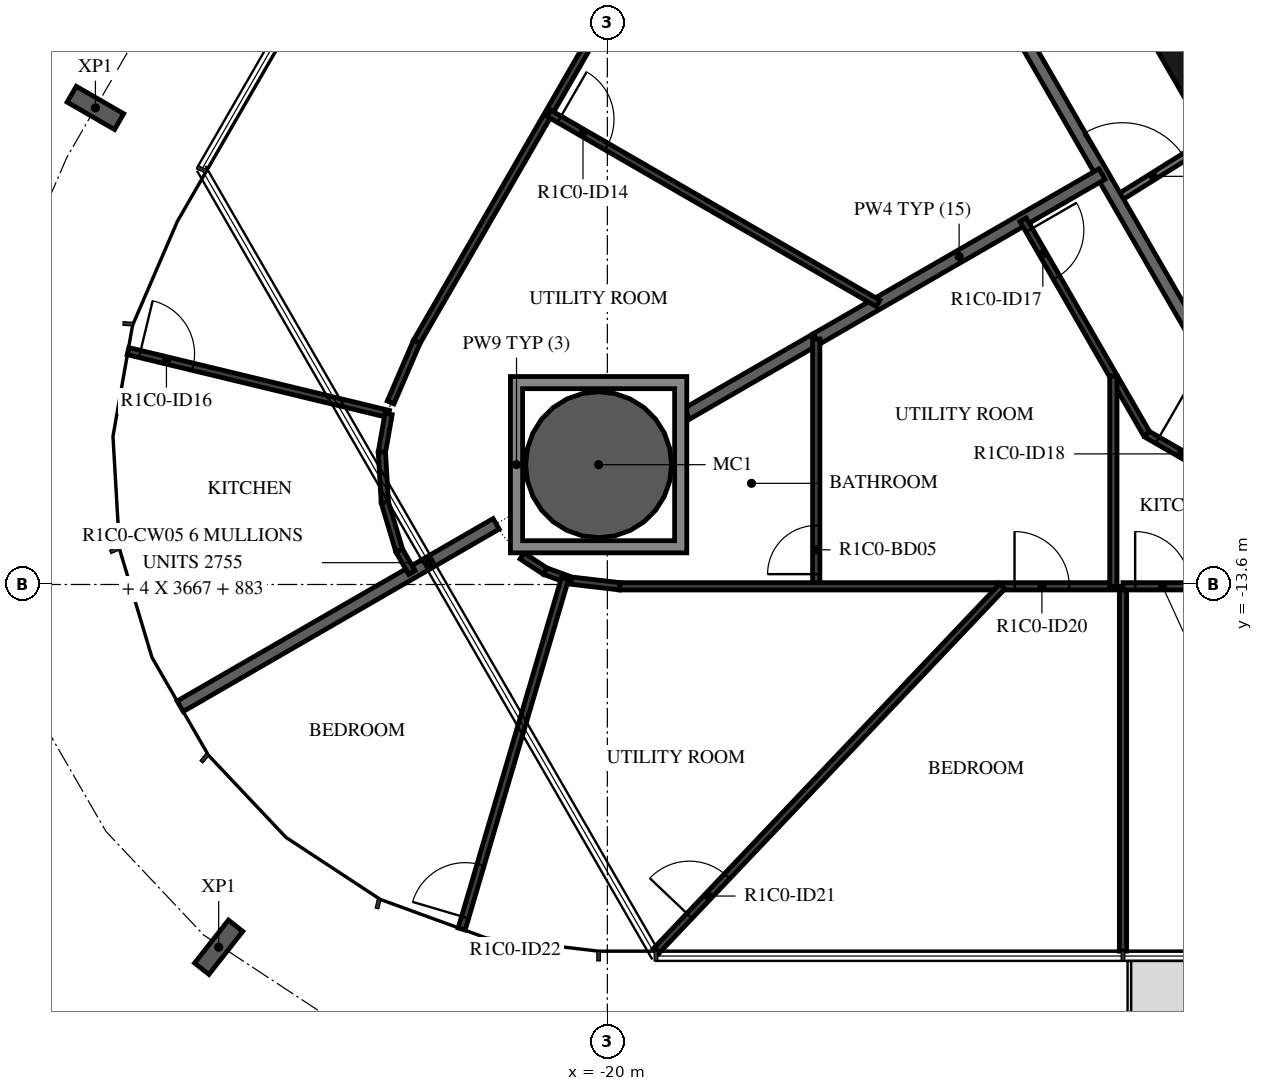
"""IFC4 building model, lengths in metres.
Left out: names, types, materials, properties, quantities, classifications, styles, units other than length and angle.
Written with IfcOpenShell. Run it as: python <this file> out.ifc"""

import sys

from ifc_helpers import new_model, si_unit, direction, frame, frame_2d, origin, origin_2d, place, context, subcontext, project, spatial, polyline, rectangle, hollow_circle, i_section, outline, extrude, element, fill, save


model = new_model("IFC4")
c1 = context("Model", 3, precision=1e-05, world=origin(), true_north=direction((0.0, 1.0)))
c2 = subcontext(c1, "Body", "Model", "MODEL_VIEW")
j1 = project(units=[si_unit("LENGTHUNIT", "METRE"), si_unit("PLANEANGLEUNIT", "RADIAN")], contexts=[c1])
p1 = place(None, origin())
s1 = spatial("IfcSite", under=j1, at=p1, CompositionType="ELEMENT")
p2 = place(p1, origin())
s2 = spatial("IfcBuilding", under=s1, at=p2, CompositionType="ELEMENT")
p3 = place(p2, frame((0.0, 0.0, 66.4)))
s3 = spatial("IfcBuildingStorey", under=s2, at=p3, CompositionType="ELEMENT", Elevation=66.4)
p4 = place(p3, frame((-20.144, -11.63, -0.38), z_axis=(0.0, 0.0, 1.0), x_axis=(1.0, 0.0, 0.0)))
e1 = element("IfcColumn", 1, at=p4, inside=s3, PredefinedType="COLUMN", context=c2, shape_type="SweptSolid", body=[
    extrude(hollow_circle(Radius=1.2, WallThickness=0.06, at=origin_2d()), origin(), (0.0, 0.0, 1.0), 2.616),
])
for number, where, z_axis, x_axis in (
    (2, (-28.419, -5.763, -0.38), (0.0, 0.0, 1.0), (0.5, 0.866, 0.0)),
    (3, (-26.392, -19.565, -0.38), (0.0, 0.0, 1.0), (-0.786, 0.619, 0.0)),
):
    element("IfcColumn", number, at=place(p3, frame(where, z_axis=z_axis, x_axis=x_axis)), inside=s3, PredefinedType="COLUMN", context=c2, shape_type="SweptSolid", body=[
        extrude(i_section(OverallWidth=0.3, OverallDepth=0.9, WebThickness=0.019, FlangeThickness=0.035, FilletRadius=0.03, at=origin_2d()), origin(), (0.0, 0.0, 1.0), 2.616),
    ])
p5 = place(p3, frame((-10.845, -4.51, 0.0), z_axis=(0.0, 0.0, 1.0), x_axis=(0.500087131594, -0.865975092491, 0.0)))
e4 = element("IfcWall", 4, at=p5, inside=s3, PredefinedType="SHEAR", context=c2, shape_type="SweptSolid", body=[
    extrude(rectangle(XDim=3.033, YDim=0.5, at=frame_2d((1.516, 0.0))), origin(), (0.0, 0.0, 1.0), 3.05),
])
p6 = place(p3, frame((-11.625, -7.264, 0.0), z_axis=(0.0, 0.0, 1.0), x_axis=(0.84803632456, 0.529938102259, 0.0)))
e5 = element("IfcWall", 5, at=p6, inside=s3, PredefinedType="PARTITIONING", context=c2, shape_type="SweptSolid", body=[
    extrude(rectangle(XDim=1.804, YDim=0.12, at=frame_2d((0.902, 0.0))), origin(), (0.0, 0.0, 1.0), 3.05),
])
p7 = place(p6, frame((0.11, 0.0, 0.0)))
e6 = element("IfcOpeningElement", 6, at=p7, cuts=e5, PredefinedType="OPENING", context=c2, shape_type="SweptSolid", body=[
    extrude(rectangle(XDim=1.2, YDim=2.1, at=frame_2d((0.6, 1.05))), frame((0.0, 0.07, 0.0), z_axis=(0.0, -1.0, 0.0), x_axis=(1.0, 0.0, 0.0)), (0.0, 0.0, 1.0), 0.14),
])
p8 = place(p3, frame((-13.7, -3.671, 0.0), z_axis=(0.0, 0.0, 1.0), x_axis=(0.500001669485, -0.866024439905, 0.0)))
e7 = element("IfcWall", 7, at=p8, inside=s3, PredefinedType="STANDARD", context=c2, shape_type="SweptSolid", body=[
    extrude(rectangle(XDim=7.342, YDim=0.2, at=frame_2d((3.671, 0.0))), origin(), (0.0, 0.0, 1.0), 3.05),
])
p9 = place(p3, frame((-16.565, -9.564, 0.0), z_axis=(0.0, 0.0, 1.0), x_axis=(0.866028274568, 0.499995027624, 0.0)))
e8 = element("IfcWall", 8, at=p9, inside=s3, PredefinedType="STANDARD", context=c2, shape_type="SweptSolid", body=[
    extrude(rectangle(XDim=5.427, YDim=0.2, at=frame_2d((2.714, 0.0))), origin(), (0.0, 0.0, 1.0), 3.05),
])
p10 = place(p3, frame((-27.025, -15.603, 0.0), z_axis=(0.0, 0.0, 1.0), x_axis=(0.866020924479, 0.500007758305, 0.0)))
e9 = element("IfcWall", 9, at=p10, inside=s3, PredefinedType="STANDARD", context=c2, shape_type="SweptSolid", body=[
    extrude(rectangle(XDim=6.0, YDim=0.2, at=frame_2d((3.0, 0.0))), origin(), (0.0, 0.0, 1.0), 3.05),
])
p11 = place(p3, frame((-18.694, -10.793, 0.0), z_axis=(0.0, 0.0, 1.0), x_axis=(0.866046662726, 0.499963176624, 0.0)))
e10 = element("IfcWall", 10, at=p11, inside=s3, PredefinedType="STANDARD", context=c2, shape_type="SweptSolid", body=[
    extrude(rectangle(XDim=2.458, YDim=0.2, at=frame_2d((1.229, 0.0))), origin(), (0.0, 0.0, 1.0), 3.05),
])
p12 = place(p3, frame((-17.13, 0.79, 0.0), z_axis=(0.0, 0.0, 1.0), x_axis=(-0.499997052475, -0.866027105532, 0.0)))
e11 = element("IfcWall", 11, at=p12, inside=s3, PredefinedType="PARTITIONING", context=c2, shape_type="SweptSolid", body=[
    extrude(rectangle(XDim=12.006, YDim=0.12, at=frame_2d((6.003, 0.0))), origin(), (0.0, 0.0, 1.0), 3.05),
])
p13 = place(p12, frame((1.498, 0.0, 0.0)))
e12 = element("IfcOpeningElement", 12, at=p13, cuts=e11, PredefinedType="OPENING", context=c2, shape_type="SweptSolid", body=[
    extrude(rectangle(XDim=0.9, YDim=2.1, at=frame_2d((0.45, 1.05))), frame((0.0, 0.07, 0.0), z_axis=(0.0, -1.0, 0.0), x_axis=(1.0, 0.0, 0.0)), (0.0, 0.0, 1.0), 0.14),
])
p14 = place(p3, frame((-20.963, -5.85, 0.0), z_axis=(0.0, 0.0, 1.0), x_axis=(0.866021746608, -0.500006334362, 0.0)))
e13 = element("IfcWall", 13, at=p14, inside=s3, PredefinedType="PARTITIONING", context=c2, shape_type="SweptSolid", body=[
    extrude(rectangle(XDim=6.253, YDim=0.12, at=frame_2d((3.127, 0.0))), origin(), (0.0, 0.0, 1.0), 3.05),
])
p15 = place(p14, frame((0.2, 0.0, 0.0)))
e14 = element("IfcOpeningElement", 14, at=p15, cuts=e13, PredefinedType="OPENING", context=c2, shape_type="SweptSolid", body=[
    extrude(rectangle(XDim=0.9, YDim=2.1, at=frame_2d((0.45, 1.05))), frame((0.0, 0.07, 0.0), z_axis=(0.0, -1.0, 0.0), x_axis=(1.0, 0.0, 0.0)), (0.0, 0.0, 1.0), 0.14),
])
p16 = place(p3, frame((-23.564, -10.606, 0.0), z_axis=(0.0, 0.0, 1.0), x_axis=(0.396195073027, 0.918166359713, 0.0)))
e15 = element("IfcWall", 15, at=p16, inside=s3, PredefinedType="PARTITIONING", context=c2, shape_type="SweptSolid", body=[
    extrude(rectangle(XDim=1.087, YDim=0.12, at=frame_2d((0.543, 0.0))), origin(), (0.0, 0.0, 1.0), 3.05),
])
p17 = place(p3, frame((-27.883, -9.762, 0.0), z_axis=(0.0, 0.0, 1.0), x_axis=(0.972097015458, -0.234579181809, 0.0)))
e16 = element("IfcWall", 16, at=p17, inside=s3, PredefinedType="PARTITIONING", context=c2, shape_type="SweptSolid", body=[
    extrude(rectangle(XDim=4.409, YDim=0.12, at=frame_2d((2.204, 0.0))), origin(), (0.0, 0.0, 1.0), 3.05),
])
p18 = place(p17, frame((0.2, 0.0, 0.0)))
e17 = element("IfcOpeningElement", 17, at=p18, cuts=e16, PredefinedType="OPENING", context=c2, shape_type="SweptSolid", body=[
    extrude(rectangle(XDim=0.9, YDim=2.1, at=frame_2d((0.45, 1.05))), frame((0.0, 0.07, 0.0), z_axis=(0.0, -1.0, 0.0), x_axis=(1.0, 0.0, 0.0)), (0.0, 0.0, 1.0), 0.14),
])
p19 = place(p3, frame((-23.597, -10.796, 0.0), z_axis=(0.0, 0.0, 1.0), x_axis=(-0.173610040386, -0.984814476882, 0.0)))
e18 = element("IfcWall", 18, at=p19, inside=s3, PredefinedType="PARTITIONING", context=c2, shape_type="SweptSolid", body=[
    extrude(rectangle(XDim=0.636, YDim=0.12, at=frame_2d((0.318, 0.0))), origin(), (0.0, 0.0, 1.0), 3.05),
])
p20 = place(p3, frame((-23.708, -11.422, 0.0), z_axis=(0.0, 0.0, 1.0), x_axis=(0.058031280246, -0.998314765248, 0.0)))
e19 = element("IfcWall", 19, at=p20, inside=s3, PredefinedType="PARTITIONING", context=c2, shape_type="SweptSolid", body=[
    extrude(rectangle(XDim=0.829, YDim=0.12, at=frame_2d((0.415, 0.0))), origin(), (0.0, 0.0, 1.0), 3.05),
])
p21 = place(p3, frame((-23.659, -12.25, 0.0), z_axis=(0.0, 0.0, 1.0), x_axis=(0.286834510868, -0.957980147694, 0.0)))
e20 = element("IfcWall", 20, at=p21, inside=s3, PredefinedType="PARTITIONING", context=c2, shape_type="SweptSolid", body=[
    extrude(rectangle(XDim=0.829, YDim=0.12, at=frame_2d((0.415, 0.0))), origin(), (0.0, 0.0, 1.0), 3.05),
])
p22 = place(p3, frame((-23.422, -13.044, 0.0), z_axis=(0.0, 0.0, 1.0), x_axis=(0.50013037474, -0.865950118807, 0.0)))
e21 = element("IfcWall", 21, at=p22, inside=s3, PredefinedType="PARTITIONING", context=c2, shape_type="SweptSolid", body=[
    extrude(rectangle(XDim=0.415, YDim=0.12, at=frame_2d((0.207, 0.0))), origin(), (0.0, 0.0, 1.0), 3.05),
])
p23 = place(p3, frame((-13.164, -7.6, 0.0), z_axis=(0.0, 0.0, 1.0), x_axis=(0.500000928893, -0.866024867487, 0.0)))
e22 = element("IfcWall", 22, at=p23, inside=s3, PredefinedType="PARTITIONING", context=c2, shape_type="SweptSolid", body=[
    extrude(rectangle(XDim=4.073, YDim=0.12, at=frame_2d((2.036, 0.0))), origin(), (0.0, 0.0, 1.0), 3.05),
])
p24 = place(p23, frame((0.2, 0.0, 0.0)))
e23 = element("IfcOpeningElement", 23, at=p24, cuts=e22, PredefinedType="OPENING", context=c2, shape_type="SweptSolid", body=[
    extrude(rectangle(XDim=0.9, YDim=2.1, at=frame_2d((0.45, 1.05))), frame((0.0, 0.07, 0.0), z_axis=(0.0, -1.0, 0.0), x_axis=(1.0, 0.0, 0.0)), (0.0, 0.0, 1.0), 0.14),
])
p25 = place(p3, frame((-11.127, -11.127, 0.0), z_axis=(0.0, 0.0, 1.0), x_axis=(0.866034514313, -0.499984219769, 0.0)))
e24 = element("IfcWall", 24, at=p25, inside=s3, PredefinedType="PARTITIONING", context=c2, shape_type="SweptSolid", body=[
    extrude(rectangle(XDim=5.006, YDim=0.12, at=frame_2d((2.503, 0.0))), origin(), (0.0, 0.0, 1.0), 3.05),
])
p26 = place(p25, frame((0.2, 0.0, 0.0)))
e25 = element("IfcOpeningElement", 25, at=p26, cuts=e24, PredefinedType="OPENING", context=c2, shape_type="SweptSolid", body=[
    extrude(rectangle(XDim=0.9, YDim=2.1, at=frame_2d((0.45, 1.05))), frame((0.0, 0.07, 0.0), z_axis=(0.0, -1.0, 0.0), x_axis=(1.0, 0.0, 0.0)), (0.0, 0.0, 1.0), 0.14),
])
p27 = place(p3, frame((-20.657, -13.514, 0.0), z_axis=(0.0, 0.0, 1.0), x_axis=(-0.939665068469, 0.34209583321, 0.0)))
e26 = element("IfcWall", 26, at=p27, inside=s3, PredefinedType="PARTITIONING", context=c2, shape_type="SweptSolid", body=[
    extrude(rectangle(XDim=0.389, YDim=0.12, at=frame_2d((0.194, 0.0))), origin(), (0.0, 0.0, 1.0), 3.05),
])
p28 = place(p3, frame((-21.023, -13.381, 0.0), z_axis=(0.0, 0.0, 1.0), x_axis=(-0.835339231854, 0.549734815821, 0.0)))
e27 = element("IfcWall", 27, at=p28, inside=s3, PredefinedType="PARTITIONING", context=c2, shape_type="SweptSolid", body=[
    extrude(rectangle(XDim=0.455, YDim=0.12, at=frame_2d((0.228, 0.0))), origin(), (0.0, 0.0, 1.0), 3.05),
])
p29 = place(p3, frame((-22.396, -19.266, 0.0), z_axis=(0.0, 0.0, 1.0), x_axis=(0.282896205585, 0.959150528783, 0.0)))
e28 = element("IfcWall", 28, at=p29, inside=s3, PredefinedType="PARTITIONING", context=c2, shape_type="SweptSolid", body=[
    extrude(rectangle(XDim=6.012, YDim=0.12, at=frame_2d((3.006, 0.0))), origin(), (0.0, 0.0, 1.0), 3.05),
])
p30 = place(p29, frame((0.2, 0.0, 0.0)))
e29 = element("IfcOpeningElement", 29, at=p30, cuts=e28, PredefinedType="OPENING", context=c2, shape_type="SweptSolid", body=[
    extrude(rectangle(XDim=0.9, YDim=2.1, at=frame_2d((0.45, 1.05))), frame((0.0, 0.07, 0.0), z_axis=(0.0, -1.0, 0.0), x_axis=(1.0, 0.0, 0.0)), (0.0, 0.0, 1.0), 0.14),
])
p31 = place(p3, frame((-16.565, -13.63, 0.0), z_axis=(0.0, 0.0, 1.0), x_axis=(0.0, 1.0, 0.0)))
e30 = element("IfcWall", 30, at=p31, inside=s3, PredefinedType="PARTITIONING", context=c2, shape_type="SweptSolid", body=[
    extrude(rectangle(XDim=4.066, YDim=0.12, at=frame_2d((2.033, 0.0))), origin(), (0.0, 0.0, 1.0), 3.05),
])
p32 = place(p31, frame((0.2, 0.0, 0.0)))
e31 = element("IfcOpeningElement", 31, at=p32, cuts=e30, PredefinedType="OPENING", context=c2, shape_type="SweptSolid", body=[
    extrude(rectangle(XDim=0.8, YDim=2.1, at=frame_2d((0.4, 1.05))), frame((0.0, 0.07, 0.0), z_axis=(0.0, -1.0, 0.0), x_axis=(1.0, 0.0, 0.0)), (0.0, 0.0, 1.0), 0.14),
])
p33 = place(p3, frame((-20.595, -13.536, 0.0), z_axis=(0.0, 0.0, 1.0), x_axis=(0.993259655268, -0.115910556968, 0.0)))
e32 = element("IfcWall", 32, at=p33, inside=s3, PredefinedType="PARTITIONING", context=c2, shape_type="SweptSolid", body=[
    extrude(rectangle(XDim=0.807, YDim=0.12, at=frame_2d((0.403, 0.0))), origin(), (0.0, 0.0, 1.0), 3.05),
])
p34 = place(p3, frame((-19.794, -13.63, 0.0), z_axis=(0.0, 0.0, 1.0), x_axis=(1.0, 0.0, 0.0)))
e33 = element("IfcWall", 33, at=p34, inside=s3, PredefinedType="PARTITIONING", context=c2, shape_type="SweptSolid", body=[
    extrude(rectangle(XDim=8.156, YDim=0.12, at=frame_2d((4.078, 0.0))), origin(), (0.0, 0.0, 1.0), 3.05),
])
p35 = place(p34, frame((6.491, 0.0, 0.0)))
e34 = element("IfcOpeningElement", 34, at=p35, cuts=e33, PredefinedType="OPENING", context=c2, shape_type="SweptSolid", body=[
    extrude(rectangle(XDim=0.9, YDim=2.1, at=frame_2d((0.45, 1.05))), frame((0.0, 0.07, 0.0), z_axis=(0.0, -1.0, 0.0), x_axis=(1.0, 0.0, 0.0)), (0.0, 0.0, 1.0), 0.14),
])
p36 = place(p3, frame((-11.678, -13.63, 0.0), z_axis=(0.0, 0.0, 1.0), x_axis=(0.0, 1.0, 0.0)))
e35 = element("IfcWall", 35, at=p36, inside=s3, PredefinedType="PARTITIONING", context=c2, shape_type="SweptSolid", body=[
    extrude(rectangle(XDim=3.458, YDim=0.12, at=frame_2d((1.729, 0.0))), origin(), (0.0, 0.0, 1.0), 3.05),
])
p37 = place(p3, frame((-19.2, -19.63, 0.0), z_axis=(0.0, 0.0, 1.0), x_axis=(0.688544699396, 0.72519390299, 0.0)))
e36 = element("IfcWall", 36, at=p37, inside=s3, PredefinedType="PARTITIONING", context=c2, shape_type="SweptSolid", body=[
    extrude(rectangle(XDim=8.274, YDim=0.12, at=frame_2d((4.137, 0.0))), origin(), (0.0, 0.0, 1.0), 3.05),
])
p38 = place(p37, frame((0.8, 0.0, 0.0)))
e37 = element("IfcOpeningElement", 37, at=p38, cuts=e36, PredefinedType="OPENING", context=c2, shape_type="SweptSolid", body=[
    extrude(rectangle(XDim=0.9, YDim=2.1, at=frame_2d((0.45, 1.05))), frame((0.0, 0.07, 0.0), z_axis=(0.0, -1.0, 0.0), x_axis=(1.0, 0.0, 0.0)), (0.0, 0.0, 1.0), 0.14),
])
p39 = place(p3, frame((-11.52, -19.63, 0.0), z_axis=(0.0, 0.0, 1.0), x_axis=(0.0, 1.0, 0.0)))
e38 = element("IfcWall", 38, at=p39, inside=s3, PredefinedType="PARTITIONING", context=c2, shape_type="SweptSolid", body=[
    extrude(rectangle(XDim=6.0, YDim=0.12, at=frame_2d((3.0, 0.0))), origin(), (0.0, 0.0, 1.0), 3.05),
])
p40 = place(p3, frame((-11.52, -13.63, 0.0), z_axis=(0.0, 0.0, 1.0), x_axis=(1.0, 0.0, 0.0)))
e39 = element("IfcWall", 39, at=p40, inside=s3, PredefinedType="PARTITIONING", context=c2, shape_type="SweptSolid", body=[
    extrude(rectangle(XDim=4.728, YDim=0.12, at=frame_2d((2.364, 0.0))), origin(), (0.0, 0.0, 1.0), 3.05),
])
p41 = place(p40, frame((0.2, 0.0, 0.0)))
e40 = element("IfcOpeningElement", 40, at=p41, cuts=e39, PredefinedType="OPENING", context=c2, shape_type="SweptSolid", body=[
    extrude(rectangle(XDim=0.9, YDim=2.1, at=frame_2d((0.45, 1.05))), frame((0.0, 0.07, 0.0), z_axis=(0.0, -1.0, 0.0), x_axis=(1.0, 0.0, 0.0)), (0.0, 0.0, 1.0), 0.14),
])
p42 = place(p3, origin())
e41 = element("IfcWall", 41, at=p42, inside=s3, PredefinedType="STANDARD", context=c2, shape_type="SweptSolid", body=[
    extrude(outline(polyline([(-18.694, -10.18), (-18.694, -13.08), (-21.594, -13.08), (-21.594, -10.18), (-18.694, -10.18)]), holes=[polyline([(-21.394, -12.88), (-18.894, -12.88), (-18.894, -10.38), (-21.394, -10.38), (-21.394, -12.88)])]), origin(), (0.0, 0.0, 1.0), 3.05),
])
p43 = place(p15, origin())
e42 = element("IfcDoor", 42, at=p43, inside=s3, OperationType="SINGLE_SWING_RIGHT", PredefinedType="DOOR", context=c2, shape_type="SweptSolid", body=[
    extrude(rectangle(XDim=0.9, YDim=2.1, at=frame_2d((0.45, 1.05))), frame((0.0, 0.025, 0.0), z_axis=(0.0, -1.0, 0.0), x_axis=(1.0, 0.0, 0.0)), (0.0, 0.0, 1.0), 0.05),
])
fill(e14, e42)
p44 = place(p18, origin())
e43 = element("IfcDoor", 43, at=p44, inside=s3, OperationType="SINGLE_SWING_RIGHT", PredefinedType="DOOR", context=c2, shape_type="SweptSolid", body=[
    extrude(rectangle(XDim=0.9, YDim=2.1, at=frame_2d((0.45, 1.05))), frame((0.0, 0.025, 0.0), z_axis=(0.0, -1.0, 0.0), x_axis=(1.0, 0.0, 0.0)), (0.0, 0.0, 1.0), 0.05),
])
fill(e17, e43)
p45 = place(p24, origin())
e44 = element("IfcDoor", 44, at=p45, inside=s3, OperationType="SINGLE_SWING_LEFT", PredefinedType="DOOR", context=c2, shape_type="SweptSolid", body=[
    extrude(rectangle(XDim=0.9, YDim=2.1, at=frame_2d((0.45, 1.05))), frame((0.0, 0.025, 0.0), z_axis=(0.0, -1.0, 0.0), x_axis=(1.0, 0.0, 0.0)), (0.0, 0.0, 1.0), 0.05),
])
fill(e23, e44)
p46 = place(p26, origin())
e45 = element("IfcDoor", 45, at=p46, inside=s3, OperationType="SINGLE_SWING_LEFT", PredefinedType="DOOR", context=c2, shape_type="SweptSolid", body=[
    extrude(rectangle(XDim=0.9, YDim=2.1, at=frame_2d((0.45, 1.05))), frame((0.0, 0.025, 0.0), z_axis=(0.0, -1.0, 0.0), x_axis=(1.0, 0.0, 0.0)), (0.0, 0.0, 1.0), 0.05),
])
fill(e25, e45)
p47 = place(p32, origin())
e46 = element("IfcDoor", 46, at=p47, inside=s3, OperationType="SINGLE_SWING_LEFT", PredefinedType="DOOR", context=c2, shape_type="SweptSolid", body=[
    extrude(rectangle(XDim=0.8, YDim=2.1, at=frame_2d((0.4, 1.05))), frame((0.0, 0.025, 0.0), z_axis=(0.0, -1.0, 0.0), x_axis=(1.0, 0.0, 0.0)), (0.0, 0.0, 1.0), 0.05),
])
fill(e31, e46)
p48 = place(p35, origin())
e47 = element("IfcDoor", 47, at=p48, inside=s3, OperationType="SINGLE_SWING_LEFT", PredefinedType="DOOR", context=c2, shape_type="SweptSolid", body=[
    extrude(rectangle(XDim=0.9, YDim=2.1, at=frame_2d((0.45, 1.05))), frame((0.0, 0.025, 0.0), z_axis=(0.0, -1.0, 0.0), x_axis=(1.0, 0.0, 0.0)), (0.0, 0.0, 1.0), 0.05),
])
fill(e34, e47)
p49 = place(p38, origin())
e48 = element("IfcDoor", 48, at=p49, inside=s3, OperationType="SINGLE_SWING_LEFT", PredefinedType="DOOR", context=c2, shape_type="SweptSolid", body=[
    extrude(rectangle(XDim=0.9, YDim=2.1, at=frame_2d((0.45, 1.05))), frame((0.0, 0.025, 0.0), z_axis=(0.0, -1.0, 0.0), x_axis=(1.0, 0.0, 0.0)), (0.0, 0.0, 1.0), 0.05),
])
fill(e37, e48)
p50 = place(p30, origin())
e49 = element("IfcDoor", 49, at=p50, inside=s3, OperationType="SINGLE_SWING_LEFT", PredefinedType="DOOR", context=c2, shape_type="SweptSolid", body=[
    extrude(rectangle(XDim=0.9, YDim=2.1, at=frame_2d((0.45, 1.05))), frame((0.0, 0.025, 0.0), z_axis=(0.0, -1.0, 0.0), x_axis=(1.0, 0.0, 0.0)), (0.0, 0.0, 1.0), 0.05),
])
fill(e29, e49)
p51 = place(p41, origin())
e50 = element("IfcDoor", 50, at=p51, inside=s3, OperationType="SINGLE_SWING_RIGHT", PredefinedType="DOOR", context=c2, shape_type="SweptSolid", body=[
    extrude(rectangle(XDim=0.9, YDim=2.1, at=frame_2d((0.45, 1.05))), frame((0.0, 0.025, 0.0), z_axis=(0.0, -1.0, 0.0), x_axis=(1.0, 0.0, 0.0)), (0.0, 0.0, 1.0), 0.05),
])
fill(e40, e50)
p52 = place(p7, origin())
e51 = element("IfcDoor", 51, at=p52, inside=s3, OperationType="DOUBLE_DOOR_SINGLE_SWING", PredefinedType="DOOR", context=c2, shape_type="SweptSolid", body=[
    extrude(rectangle(XDim=1.2, YDim=2.1, at=frame_2d((0.6, 1.05))), frame((0.0, 0.025, 0.0), z_axis=(0.0, -1.0, 0.0), x_axis=(1.0, 0.0, 0.0)), (0.0, 0.0, 1.0), 0.05),
])
fill(e6, e51)
save(model, sys.argv[1])
